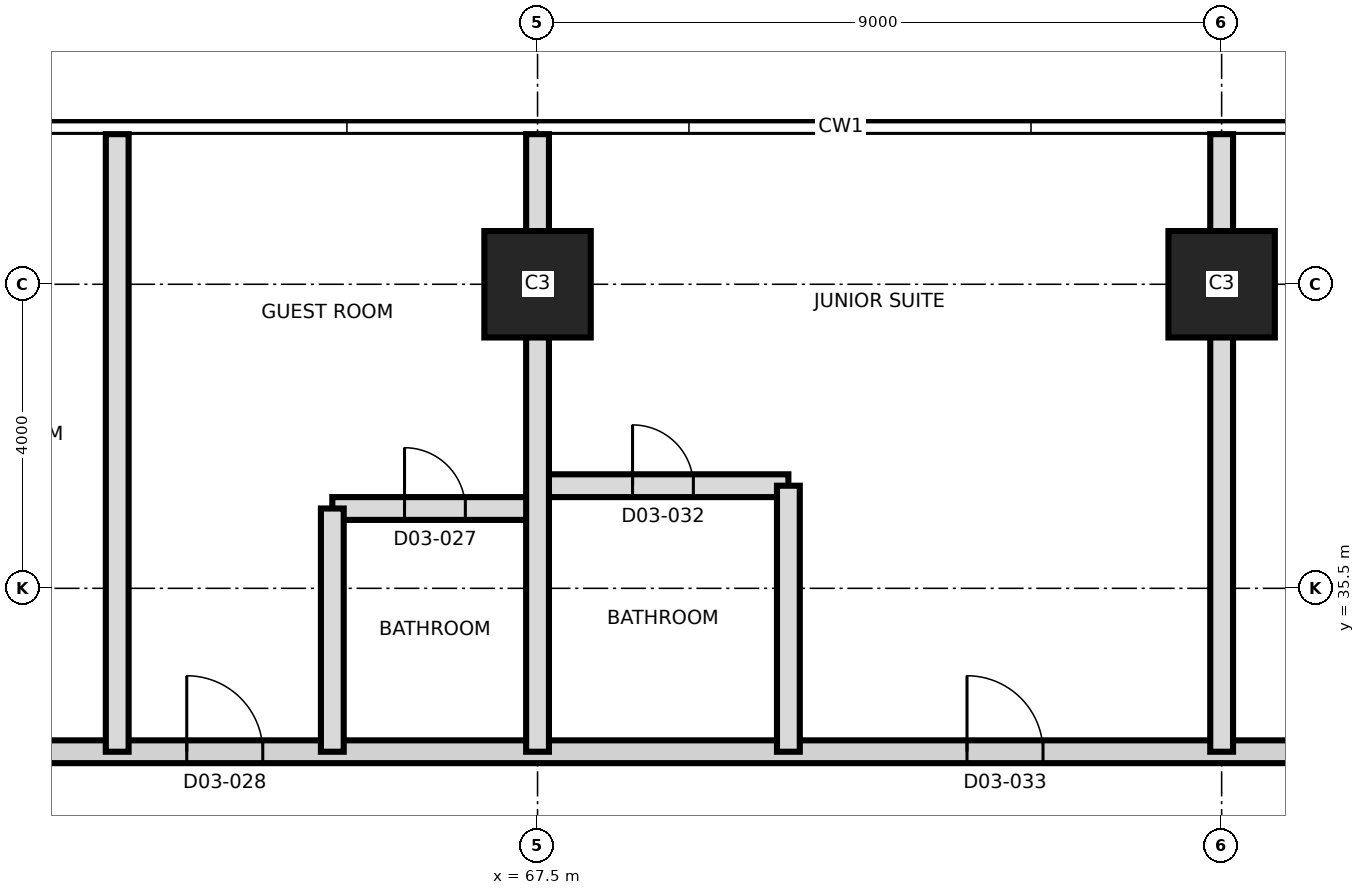
"""IFC4 building model, lengths in metres.
Left out: names, types, materials, properties, quantities, classifications, styles, units other than length and angle.
Written with IfcOpenShell. Run it as: python <this file> out.ifc"""

import sys

from ifc_helpers import new_model, si_unit, direction, frame, frame_2d, origin, origin_2d, place, context, subcontext, project, spatial, rectangle, extrude, element, fill, save


model = new_model("IFC4")
c1 = context("Model", 3, precision=1e-05, world=origin(), true_north=direction((0.0, 1.0)))
c2 = subcontext(c1, "Body", "Model", "MODEL_VIEW")
j1 = project(units=[si_unit("LENGTHUNIT", "METRE"), si_unit("PLANEANGLEUNIT", "RADIAN")], contexts=[c1])
p1 = place(None, origin())
s1 = spatial("IfcSite", under=j1, at=p1, CompositionType="ELEMENT")
p2 = place(p1, origin())
s2 = spatial("IfcBuilding", under=s1, at=p2, CompositionType="ELEMENT")
p3 = place(p2, frame((0.0, 0.0, 52.0)))
s3 = spatial("IfcBuildingStorey", under=s2, at=p3, CompositionType="ELEMENT", Elevation=52.0)
for number, where, z_axis, x_axis in (
    (1, (67.5, 39.5, 0.0), (0.0, 0.0, 1.0), (1.0, 0.0, 0.0)),
    (2, (76.5, 39.5, 0.0), (0.0, 0.0, 1.0), (1.0, 0.0, 0.0)),
):
    element("IfcColumn", number, at=place(p3, frame(where, z_axis=z_axis, x_axis=x_axis)), inside=s3, PredefinedType="COLUMN", context=c2, shape_type="SweptSolid", body=[
        extrude(rectangle(XDim=1.4, YDim=1.4, at=origin_2d()), origin(), (0.0, 0.0, 1.0), 3.7),
    ])
p4 = place(p3, frame((58.95, 33.35, 0.0), z_axis=(0.0, 0.0, 1.0), x_axis=(1.0, 0.0, 0.0)))
e3 = element("IfcWall", 3, at=p4, inside=s3, PredefinedType="PARTITIONING", context=c2, shape_type="SweptSolid", body=[
    extrude(rectangle(XDim=26.38, YDim=0.3, at=frame_2d((13.19, 0.0))), origin(), (0.0, 0.0, 1.0), 3.4),
])
p5 = place(p4, frame((0.685, 0.0, 0.0)))
e4 = element("IfcOpeningElement", 4, at=p5, cuts=e3, PredefinedType="OPENING", context=c2, shape_type="SweptSolid", body=[
    extrude(rectangle(XDim=1.2, YDim=2.1, at=frame_2d((0.6, 1.05))), frame((0.0, 0.16, 0.0), z_axis=(0.0, -1.0, 0.0), x_axis=(1.0, 0.0, 0.0)), (0.0, 0.0, 1.0), 0.32),
])
p6 = place(p4, frame((3.935, 0.0, 0.0)))
e5 = element("IfcOpeningElement", 5, at=p6, cuts=e3, PredefinedType="OPENING", context=c2, shape_type="SweptSolid", body=[
    extrude(rectangle(XDim=1.0, YDim=2.1, at=frame_2d((0.5, 1.05))), frame((0.0, 0.16, 0.0), z_axis=(0.0, -1.0, 0.0), x_axis=(1.0, 0.0, 0.0)), (0.0, 0.0, 1.0), 0.32),
])
p7 = place(p4, frame((14.2, 0.0, 0.0)))
e6 = element("IfcOpeningElement", 6, at=p7, cuts=e3, PredefinedType="OPENING", context=c2, shape_type="SweptSolid", body=[
    extrude(rectangle(XDim=1.0, YDim=2.4, at=frame_2d((0.5, 1.2))), frame((0.0, 0.16, 0.0), z_axis=(0.0, -1.0, 0.0), x_axis=(1.0, 0.0, 0.0)), (0.0, 0.0, 1.0), 0.32),
])
p8 = place(p4, frame((19.25, 0.0, 0.0)))
e7 = element("IfcOpeningElement", 7, at=p8, cuts=e3, PredefinedType="OPENING", context=c2, shape_type="SweptSolid", body=[
    extrude(rectangle(XDim=1.2, YDim=2.1, at=frame_2d((0.6, 1.05))), frame((0.0, 0.16, 0.0), z_axis=(0.0, -1.0, 0.0), x_axis=(1.0, 0.0, 0.0)), (0.0, 0.0, 1.0), 0.32),
])
p9 = place(p4, frame((22.5, 0.0, 0.0)))
e8 = element("IfcOpeningElement", 8, at=p9, cuts=e3, PredefinedType="OPENING", context=c2, shape_type="SweptSolid", body=[
    extrude(rectangle(XDim=1.0, YDim=2.1, at=frame_2d((0.5, 1.05))), frame((0.0, 0.16, 0.0), z_axis=(0.0, -1.0, 0.0), x_axis=(1.0, 0.0, 0.0)), (0.0, 0.0, 1.0), 0.32),
])
p10 = place(p3, frame((64.8, 36.55, 0.0), z_axis=(0.0, 0.0, 1.0), x_axis=(1.0, 0.0, 0.0)))
e9 = element("IfcWall", 9, at=p10, inside=s3, PredefinedType="PARTITIONING", context=c2, shape_type="SweptSolid", body=[
    extrude(rectangle(XDim=2.7, YDim=0.3, at=frame_2d((1.35, 0.0))), origin(), (0.0, 0.0, 1.0), 3.4),
])
p11 = place(p10, frame((0.95, 0.0, 0.0)))
e10 = element("IfcOpeningElement", 10, at=p11, cuts=e9, PredefinedType="OPENING", context=c2, shape_type="SweptSolid", body=[
    extrude(rectangle(XDim=0.8, YDim=2.1, at=frame_2d((0.4, 1.05))), frame((0.0, 0.16, 0.0), z_axis=(0.0, -1.0, 0.0), x_axis=(1.0, 0.0, 0.0)), (0.0, 0.0, 1.0), 0.32),
])
p12 = place(p3, frame((67.5, 36.85, 0.0), z_axis=(0.0, 0.0, 1.0), x_axis=(1.0, 0.0, 0.0)))
e11 = element("IfcWall", 11, at=p12, inside=s3, PredefinedType="PARTITIONING", context=c2, shape_type="SweptSolid", body=[
    extrude(rectangle(XDim=3.3, YDim=0.3, at=frame_2d((1.65, 0.0))), origin(), (0.0, 0.0, 1.0), 3.4),
])
p13 = place(p12, frame((1.25, 0.0, 0.0)))
e12 = element("IfcOpeningElement", 12, at=p13, cuts=e11, PredefinedType="OPENING", context=c2, shape_type="SweptSolid", body=[
    extrude(rectangle(XDim=0.8, YDim=2.1, at=frame_2d((0.4, 1.05))), frame((0.0, 0.16, 0.0), z_axis=(0.0, -1.0, 0.0), x_axis=(1.0, 0.0, 0.0)), (0.0, 0.0, 1.0), 0.32),
])
p14 = place(p3, frame((61.97, 33.35, 0.0), z_axis=(0.0, 0.0, 1.0), x_axis=(0.0, 1.0, 0.0)))
e13 = element("IfcWall", 13, at=p14, inside=s3, PredefinedType="PARTITIONING", context=c2, shape_type="SweptSolid", body=[
    extrude(rectangle(XDim=8.125, YDim=0.3, at=frame_2d((4.062, 0.0))), origin(), (0.0, 0.0, 1.0), 3.4),
])
p15 = place(p3, frame((64.8, 33.35, 0.0), z_axis=(0.0, 0.0, 1.0), x_axis=(0.0, 1.0, 0.0)))
e14 = element("IfcWall", 14, at=p15, inside=s3, PredefinedType="PARTITIONING", context=c2, shape_type="SweptSolid", body=[
    extrude(rectangle(XDim=3.2, YDim=0.3, at=frame_2d((1.6, 0.0))), origin(), (0.0, 0.0, 1.0), 3.4),
])
p16 = place(p3, frame((67.5, 33.35, 0.0), z_axis=(0.0, 0.0, 1.0), x_axis=(0.0, 1.0, 0.0)))
e15 = element("IfcWall", 15, at=p16, inside=s3, PredefinedType="PARTITIONING", context=c2, shape_type="SweptSolid", body=[
    extrude(rectangle(XDim=8.125, YDim=0.3, at=frame_2d((4.062, 0.0))), origin(), (0.0, 0.0, 1.0), 3.4),
])
p17 = place(p3, frame((70.8, 33.35, 0.0), z_axis=(0.0, 0.0, 1.0), x_axis=(0.0, 1.0, 0.0)))
e16 = element("IfcWall", 16, at=p17, inside=s3, PredefinedType="PARTITIONING", context=c2, shape_type="SweptSolid", body=[
    extrude(rectangle(XDim=3.5, YDim=0.3, at=frame_2d((1.75, 0.0))), origin(), (0.0, 0.0, 1.0), 3.4),
])
p18 = place(p3, frame((76.5, 33.35, 0.0), z_axis=(0.0, 0.0, 1.0), x_axis=(0.0, 1.0, 0.0)))
e17 = element("IfcWall", 17, at=p18, inside=s3, PredefinedType="PARTITIONING", context=c2, shape_type="SweptSolid", body=[
    extrude(rectangle(XDim=8.125, YDim=0.3, at=frame_2d((4.062, 0.0))), origin(), (0.0, 0.0, 1.0), 3.4),
])
p19 = place(p11, origin())
e18 = element("IfcDoor", 18, at=p19, inside=s3, OperationType="SINGLE_SWING_RIGHT", PredefinedType="DOOR", context=c2, shape_type="SweptSolid", body=[
    extrude(rectangle(XDim=0.8, YDim=2.1, at=frame_2d((0.4, 1.05))), frame((0.0, 0.025, 0.0), z_axis=(0.0, -1.0, 0.0), x_axis=(1.0, 0.0, 0.0)), (0.0, 0.0, 1.0), 0.05),
])
fill(e10, e18)
p20 = place(p6, origin())
e19 = element("IfcDoor", 19, at=p20, inside=s3, OperationType="SINGLE_SWING_LEFT", PredefinedType="DOOR", context=c2, shape_type="SweptSolid", body=[
    extrude(rectangle(XDim=1.0, YDim=2.1, at=frame_2d((0.5, 1.05))), frame((0.0, 0.025, 0.0), z_axis=(0.0, -1.0, 0.0), x_axis=(1.0, 0.0, 0.0)), (0.0, 0.0, 1.0), 0.05),
])
fill(e5, e19)
p21 = place(p13, origin())
e20 = element("IfcDoor", 20, at=p21, inside=s3, OperationType="SINGLE_SWING_LEFT", PredefinedType="DOOR", context=c2, shape_type="SweptSolid", body=[
    extrude(rectangle(XDim=0.8, YDim=2.1, at=frame_2d((0.4, 1.05))), frame((0.0, 0.025, 0.0), z_axis=(0.0, -1.0, 0.0), x_axis=(1.0, 0.0, 0.0)), (0.0, 0.0, 1.0), 0.05),
])
fill(e12, e20)
p22 = place(p7, origin())
e21 = element("IfcDoor", 21, at=p22, inside=s3, OperationType="SINGLE_SWING_LEFT", PredefinedType="DOOR", context=c2, shape_type="SweptSolid", body=[
    extrude(rectangle(XDim=1.0, YDim=2.4, at=frame_2d((0.5, 1.2))), frame((0.0, 0.025, 0.0), z_axis=(0.0, -1.0, 0.0), x_axis=(1.0, 0.0, 0.0)), (0.0, 0.0, 1.0), 0.05),
])
fill(e6, e21)
save(model, sys.argv[1])
